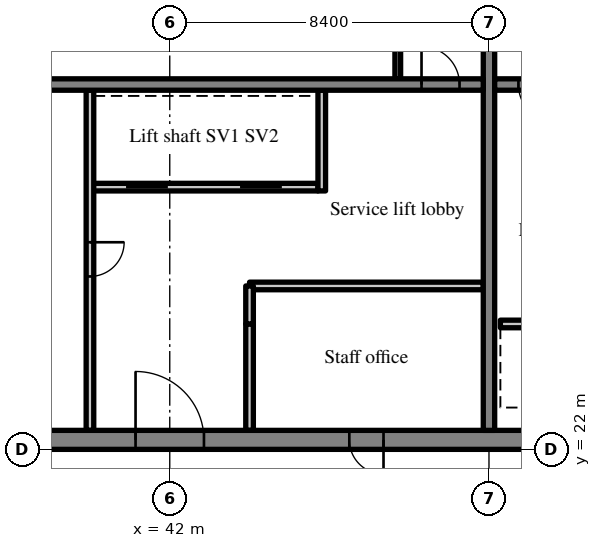
"""IFC4 building model, lengths in metres.
Left out: names, types, materials, properties, quantities, classifications, styles, units other than length and angle.
Written with IfcOpenShell. Run it as: python <this file> out.ifc"""

import sys

from ifc_helpers import new_model, si_unit, direction, frame, frame_2d, origin, place, context, subcontext, project, spatial, rectangle, extrude, source, transform, mapped, element, fill, save


model = new_model("IFC4")
c1 = context("Model", 3, precision=1e-05, world=origin(), true_north=direction((0.0, 1.0)))
c2 = subcontext(c1, "Body", "Model", "MODEL_VIEW")
j1 = project(units=[si_unit("LENGTHUNIT", "METRE"), si_unit("PLANEANGLEUNIT", "RADIAN")], contexts=[c1])
p1 = place(None, origin())
s1 = spatial("IfcSite", under=j1, at=p1, CompositionType="ELEMENT")
p2 = place(p1, origin())
s2 = spatial("IfcBuilding", under=s1, at=p2, CompositionType="ELEMENT")
p3 = place(p2, frame((0.0, 0.0, 285.7)))
s3 = spatial("IfcBuildingStorey", under=s2, at=p3, CompositionType="ELEMENT", Elevation=285.7)
m1 = source(origin(), c2, "Body", "SweptSolid", [
    extrude(rectangle(XDim=50.4, YDim=0.5, at=frame_2d((25.2, 0.0))), origin(), (0.0, 0.0, 1.0), 3.72),
])
p4 = place(p3, frame((25.2, 22.25, 0.0), z_axis=(0.0, 0.0, 1.0), x_axis=(1.0, 0.0, 0.0)))
e1 = element("IfcWall", 1, at=p4, inside=s3, PredefinedType="SHEAR", context=c2, shape_type="MappedRepresentation", body=[
    mapped(m1, transform((0.0, 0.0, 0.0), scale=1.0)),
])
m2 = source(origin(), c2, "Body", "SweptSolid", [
    extrude(rectangle(XDim=1.8, YDim=2.1, at=frame_2d((0.9, 1.05))), frame((0.0, 0.26, 0.0), z_axis=(0.0, -1.0, 0.0), x_axis=(1.0, 0.0, 0.0)), (0.0, 0.0, 1.0), 0.52),
])
p5 = place(p4, frame((15.9, 0.0, 0.0)))
e2 = element("IfcOpeningElement", 2, at=p5, cuts=e1, PredefinedType="OPENING", context=c2, shape_type="MappedRepresentation", body=[
    mapped(m2, transform((0.0, 0.0, 0.0), scale=1.0)),
])
m3 = source(origin(), c2, "Body", "SweptSolid", [
    extrude(rectangle(XDim=0.9, YDim=2.1, at=frame_2d((0.45, 1.05))), frame((0.0, 0.26, 0.0), z_axis=(0.0, -1.0, 0.0), x_axis=(1.0, 0.0, 0.0)), (0.0, 0.0, 1.0), 0.52),
])
p6 = place(p4, frame((21.525, 0.0, 0.0)))
e3 = element("IfcOpeningElement", 3, at=p6, cuts=e1, PredefinedType="OPENING", context=c2, shape_type="MappedRepresentation", body=[
    mapped(m3, transform((0.0, 0.0, 0.0), scale=1.0)),
])
p7 = place(p4, frame((32.7, 0.0, 0.0)))
e4 = element("IfcOpeningElement", 4, at=p7, cuts=e1, PredefinedType="OPENING", context=c2, shape_type="MappedRepresentation", body=[
    mapped(m2, transform((0.0, 0.0, 0.0), scale=1.0)),
])
m4 = source(origin(), c2, "Body", "SweptSolid", [
    extrude(rectangle(XDim=1.2, YDim=2.1, at=frame_2d((0.6, 1.05))), frame((0.0, 0.26, 0.0), z_axis=(0.0, -1.0, 0.0), x_axis=(1.0, 0.0, 0.0)), (0.0, 0.0, 1.0), 0.52),
])
p8 = place(p4, frame((6.5, 0.0, 0.0)))
e5 = element("IfcOpeningElement", 5, at=p8, cuts=e1, PredefinedType="OPENING", context=c2, shape_type="MappedRepresentation", body=[
    mapped(m4, transform((0.0, 0.0, 0.0), scale=1.0)),
])
p9 = place(p4, frame((47.975, 0.0, 0.0)))
e6 = element("IfcOpeningElement", 6, at=p9, cuts=e1, PredefinedType="OPENING", context=c2, shape_type="MappedRepresentation", body=[
    mapped(m4, transform((0.0, 0.0, 0.0), scale=1.0)),
])
m5 = source(origin(), c2, "Body", "SweptSolid", [
    extrude(rectangle(XDim=19.0, YDim=0.3, at=frame_2d((9.5, 0.0))), origin(), (0.0, 0.0, 1.0), 3.72),
])
p10 = place(p3, frame((50.4, 22.5, 0.0), z_axis=(0.0, 0.0, 1.0), x_axis=(0.0, 1.0, 0.0)))
e7 = element("IfcWall", 7, at=p10, inside=s3, PredefinedType="SHEAR", context=c2, shape_type="MappedRepresentation", body=[
    mapped(m5, transform((0.0, 0.0, 0.0), scale=1.0)),
])
m6 = source(origin(), c2, "Body", "SweptSolid", [
    extrude(rectangle(XDim=1.1, YDim=2.1, at=frame_2d((0.55, 1.05))), frame((0.0, 0.16, 0.0), z_axis=(0.0, -1.0, 0.0), x_axis=(1.0, 0.0, 0.0)), (0.0, 0.0, 1.0), 0.32),
])
p11 = place(p10, frame((12.95, 0.0, 0.0)))
e8 = element("IfcOpeningElement", 8, at=p11, cuts=e7, PredefinedType="OPENING", context=c2, shape_type="MappedRepresentation", body=[
    mapped(m6, transform((0.0, 0.0, 0.0), scale=1.0)),
])
m7 = source(origin(), c2, "Body", "SweptSolid", [
    extrude(rectangle(XDim=16.5, YDim=0.3, at=frame_2d((8.25, 0.0))), origin(), (0.0, 0.0, 1.0), 3.72),
])
p12 = place(p3, frame((33.75, 31.6, 0.0), z_axis=(0.0, 0.0, 1.0), x_axis=(1.0, 0.0, 0.0)))
e9 = element("IfcWall", 9, at=p12, inside=s3, PredefinedType="SHEAR", context=c2, shape_type="MappedRepresentation", body=[
    mapped(m7, transform((0.0, 0.0, 0.0), scale=1.0)),
])
m8 = source(origin(), c2, "Body", "SweptSolid", [
    extrude(rectangle(XDim=1.0, YDim=2.1, at=frame_2d((0.5, 1.05))), frame((0.0, 0.16, 0.0), z_axis=(0.0, -1.0, 0.0), x_axis=(1.0, 0.0, 0.0)), (0.0, 0.0, 1.0), 0.32),
])
p13 = place(p12, frame((14.875, 0.0, 0.0)))
e10 = element("IfcOpeningElement", 10, at=p13, cuts=e9, PredefinedType="OPENING", context=c2, shape_type="MappedRepresentation", body=[
    mapped(m8, transform((0.0, 0.0, 0.0), scale=1.0)),
])
p14 = place(p3, frame((50.55, 31.6, 0.0), z_axis=(0.0, 0.0, 1.0), x_axis=(1.0, 0.0, 0.0)))
e11 = element("IfcWall", 11, at=p14, inside=s3, PredefinedType="SHEAR", context=c2, shape_type="MappedRepresentation", body=[
    mapped(m7, transform((0.0, 0.0, 0.0), scale=1.0)),
])
p15 = place(p14, frame((0.625, 0.0, 0.0)))
e12 = element("IfcOpeningElement", 12, at=p15, cuts=e11, PredefinedType="OPENING", context=c2, shape_type="MappedRepresentation", body=[
    mapped(m8, transform((0.0, 0.0, 0.0), scale=1.0)),
])
m9 = source(origin(), c2, "Body", "SweptSolid", [
    extrude(rectangle(XDim=6.0, YDim=0.2, at=frame_2d((3.0, 0.0))), origin(), (0.0, 0.0, 1.0), 3.72),
])
p16 = place(p3, frame((39.9, 28.9, 0.0), z_axis=(0.0, 0.0, 1.0), x_axis=(1.0, 0.0, 0.0)))
e13 = element("IfcWall", 13, at=p16, inside=s3, PredefinedType="SOLIDWALL", context=c2, shape_type="MappedRepresentation", body=[
    mapped(m9, transform((0.0, 0.0, 0.0), scale=1.0)),
])
m10 = source(origin(), c2, "Body", "SweptSolid", [
    extrude(rectangle(XDim=1.1, YDim=2.1, at=frame_2d((0.55, 1.05))), frame((0.0, 0.11, 0.0), z_axis=(0.0, -1.0, 0.0), x_axis=(1.0, 0.0, 0.0)), (0.0, 0.0, 1.0), 0.22),
])
p17 = place(p16, frame((0.95, 0.0, 0.0)))
e14 = element("IfcOpeningElement", 14, at=p17, cuts=e13, PredefinedType="OPENING", context=c2, shape_type="MappedRepresentation", body=[
    mapped(m10, transform((0.0, 0.0, 0.0), scale=1.0)),
])
p18 = place(p16, frame((3.95, 0.0, 0.0)))
e15 = element("IfcOpeningElement", 15, at=p18, cuts=e13, PredefinedType="OPENING", context=c2, shape_type="MappedRepresentation", body=[
    mapped(m10, transform((0.0, 0.0, 0.0), scale=1.0)),
])
m11 = source(origin(), c2, "Body", "SweptSolid", [
    extrude(rectangle(XDim=8.95, YDim=0.2, at=frame_2d((4.475, 0.0))), origin(), (0.0, 0.0, 1.0), 3.72),
])
p19 = place(p3, frame((39.9, 22.5, 0.0), z_axis=(0.0, 0.0, 1.0), x_axis=(0.0, 1.0, 0.0)))
e16 = element("IfcWall", 16, at=p19, inside=s3, PredefinedType="PARTITIONING", context=c2, shape_type="MappedRepresentation", body=[
    mapped(m11, transform((0.0, 0.0, 0.0), scale=1.0)),
])
m12 = source(origin(), c2, "Body", "SweptSolid", [
    extrude(rectangle(XDim=0.9, YDim=2.1, at=frame_2d((0.45, 1.05))), frame((0.0, 0.11, 0.0), z_axis=(0.0, -1.0, 0.0), x_axis=(1.0, 0.0, 0.0)), (0.0, 0.0, 1.0), 0.22),
])
p20 = place(p19, frame((4.05, 0.0, 0.0)))
e17 = element("IfcOpeningElement", 17, at=p20, cuts=e16, PredefinedType="OPENING", context=c2, shape_type="MappedRepresentation", body=[
    mapped(m12, transform((0.0, 0.0, 0.0), scale=1.0)),
])
m13 = source(origin(), c2, "Body", "SweptSolid", [
    extrude(rectangle(XDim=2.8, YDim=0.2, at=frame_2d((1.4, 0.0))), origin(), (0.0, 0.0, 1.0), 3.72),
])
p21 = place(p3, frame((44.1, 22.5, 0.0), z_axis=(0.0, 0.0, 1.0), x_axis=(0.0, 1.0, 0.0)))
e18 = element("IfcWall", 18, at=p21, inside=s3, PredefinedType="PARTITIONING", context=c2, shape_type="MappedRepresentation", body=[
    mapped(m13, transform((0.0, 0.0, 0.0), scale=1.0)),
])
m14 = source(origin(), c2, "Body", "SweptSolid", [
    extrude(rectangle(XDim=2.65, YDim=0.2, at=frame_2d((1.325, 0.0))), origin(), (0.0, 0.0, 1.0), 3.72),
])
p22 = place(p3, frame((46.0, 28.8, 0.0), z_axis=(0.0, 0.0, 1.0), x_axis=(0.0, 1.0, 0.0)))
e19 = element("IfcWall", 19, at=p22, inside=s3, PredefinedType="SOLIDWALL", context=c2, shape_type="MappedRepresentation", body=[
    mapped(m14, transform((0.0, 0.0, 0.0), scale=1.0)),
])
m15 = source(origin(), c2, "Body", "SweptSolid", [
    extrude(rectangle(XDim=6.15, YDim=0.2, at=frame_2d((3.075, 0.0))), origin(), (0.0, 0.0, 1.0), 3.72),
])
p23 = place(p3, frame((44.1, 26.3, 0.0), z_axis=(0.0, 0.0, 1.0), x_axis=(1.0, 0.0, 0.0)))
e20 = element("IfcWall", 20, at=p23, inside=s3, PredefinedType="PARTITIONING", context=c2, shape_type="MappedRepresentation", body=[
    mapped(m15, transform((0.0, 0.0, 0.0), scale=1.0)),
])
m16 = source(origin(), c2, "Body", "SweptSolid", [
    extrude(rectangle(XDim=1.0, YDim=0.2, at=frame_2d((0.5, 0.0))), origin(), (0.0, 0.0, 1.0), 3.72),
])
p24 = place(p3, frame((44.1, 25.3, 0.0), z_axis=(0.0, 0.0, 1.0), x_axis=(0.0, 1.0, 0.0)))
e21 = element("IfcWall", 21, at=p24, inside=s3, PredefinedType="PARTITIONING", context=c2, shape_type="MappedRepresentation", body=[
    mapped(m16, transform((0.0, 0.0, 0.0), scale=1.0)),
])
m17 = source(origin(), c2, "Body", "SweptSolid", [
    extrude(rectangle(XDim=3.25, YDim=0.15, at=frame_2d((1.625, 0.0))), origin(), (0.0, 0.0, 1.0), 3.72),
])
p25 = place(p3, frame((48.0, 31.75, 0.0), z_axis=(0.0, 0.0, 1.0), x_axis=(0.0, 1.0, 0.0)))
e22 = element("IfcWall", 22, at=p25, inside=s3, PredefinedType="PARTITIONING", context=c2, shape_type="MappedRepresentation", body=[
    mapped(m17, transform((0.0, 0.0, 0.0), scale=1.0)),
])
p26 = place(p3, frame((56.7, 25.3, 0.0), z_axis=(0.0, 0.0, 1.0), x_axis=(-1.0, 0.0, 0.0)))
e23 = element("IfcWall", 23, at=p26, inside=s3, PredefinedType="SOLIDWALL", context=c2, shape_type="MappedRepresentation", body=[
    mapped(m9, transform((0.0, 0.0, 0.0), scale=1.0)),
])
p27 = place(p26, frame((0.95, 0.0, 0.0)))
e24 = element("IfcOpeningElement", 24, at=p27, cuts=e23, PredefinedType="OPENING", context=c2, shape_type="MappedRepresentation", body=[
    mapped(m10, transform((0.0, 0.0, 0.0), scale=1.0)),
])
p28 = place(p26, frame((3.95, 0.0, 0.0)))
e25 = element("IfcOpeningElement", 25, at=p28, cuts=e23, PredefinedType="OPENING", context=c2, shape_type="MappedRepresentation", body=[
    mapped(m10, transform((0.0, 0.0, 0.0), scale=1.0)),
])
m18 = source(origin(), c2, "Body", "SweptSolid", [
    extrude(rectangle(XDim=1.8, YDim=2.1, at=frame_2d((0.9, 1.05))), frame((0.0, 0.175, 0.0), z_axis=(0.0, -1.0, 0.0), x_axis=(1.0, 0.0, 0.0)), (0.0, 0.0, 1.0), 0.05),
])
p29 = place(p5, origin())
e26 = element("IfcDoor", 26, at=p29, inside=s3, OperationType="DOUBLE_DOOR_SINGLE_SWING", PredefinedType="DOOR", context=c2, shape_type="MappedRepresentation", body=[
    mapped(m18, transform((0.0, 0.0, 0.0), scale=1.0)),
])
fill(e2, e26)
m19 = source(origin(), c2, "Body", "SweptSolid", [
    extrude(rectangle(XDim=1.0, YDim=2.1, at=frame_2d((0.5, 1.05))), frame((0.0, 0.025, 0.0), z_axis=(0.0, -1.0, 0.0), x_axis=(1.0, 0.0, 0.0)), (0.0, 0.0, 1.0), 0.05),
])
p30 = place(p13, origin())
e27 = element("IfcDoor", 27, at=p30, inside=s3, OperationType="SINGLE_SWING_LEFT", PredefinedType="DOOR", context=c2, shape_type="MappedRepresentation", body=[
    mapped(m19, transform((0.0, 0.0, 0.0), scale=1.0)),
])
fill(e10, e27)
m20 = source(origin(), c2, "Body", "SweptSolid", [
    extrude(rectangle(XDim=1.1, YDim=2.1, at=frame_2d((0.55, 1.05))), frame((0.0, 0.025, 0.0), z_axis=(0.0, -1.0, 0.0), x_axis=(1.0, 0.0, 0.0)), (0.0, 0.0, 1.0), 0.05),
])
p31 = place(p17, origin())
e28 = element("IfcDoor", 28, at=p31, inside=s3, OperationType="SLIDING_TO_LEFT", PredefinedType="DOOR", context=c2, shape_type="MappedRepresentation", body=[
    mapped(m20, transform((0.0, 0.0, 0.0), scale=1.0)),
])
fill(e14, e28)
p32 = place(p18, origin())
e29 = element("IfcDoor", 29, at=p32, inside=s3, OperationType="SLIDING_TO_RIGHT", PredefinedType="DOOR", context=c2, shape_type="MappedRepresentation", body=[
    mapped(m20, transform((0.0, 0.0, 0.0), scale=1.0)),
])
fill(e15, e29)
m21 = source(origin(), c2, "Body", "SweptSolid", [
    extrude(rectangle(XDim=0.9, YDim=2.1, at=frame_2d((0.45, 1.05))), frame((0.0, 0.025, 0.0), z_axis=(0.0, -1.0, 0.0), x_axis=(1.0, 0.0, 0.0)), (0.0, 0.0, 1.0), 0.05),
])
p33 = place(p20, origin())
e30 = element("IfcDoor", 30, at=p33, inside=s3, OperationType="SINGLE_SWING_RIGHT", PredefinedType="DOOR", context=c2, shape_type="MappedRepresentation", body=[
    mapped(m21, transform((0.0, 0.0, 0.0), scale=1.0)),
])
fill(e17, e30)
m22 = source(origin(), c2, "Body", "SweptSolid", [
    extrude(rectangle(XDim=0.9, YDim=2.1, at=frame_2d((0.45, 1.05))), frame((0.0, 0.175, 0.0), z_axis=(0.0, -1.0, 0.0), x_axis=(1.0, 0.0, 0.0)), (0.0, 0.0, 1.0), 0.05),
])
p34 = place(p6, origin())
e31 = element("IfcDoor", 31, at=p34, inside=s3, OperationType="SINGLE_SWING_RIGHT", PredefinedType="DOOR", context=c2, shape_type="MappedRepresentation", body=[
    mapped(m22, transform((0.0, 0.0, 0.0), scale=1.0)),
])
fill(e3, e31)
p35 = place(p15, origin())
e32 = element("IfcDoor", 32, at=p35, inside=s3, OperationType="SINGLE_SWING_RIGHT", PredefinedType="DOOR", context=c2, shape_type="MappedRepresentation", body=[
    mapped(m19, transform((0.0, 0.0, 0.0), scale=1.0)),
])
fill(e12, e32)
save(model, sys.argv[1])
